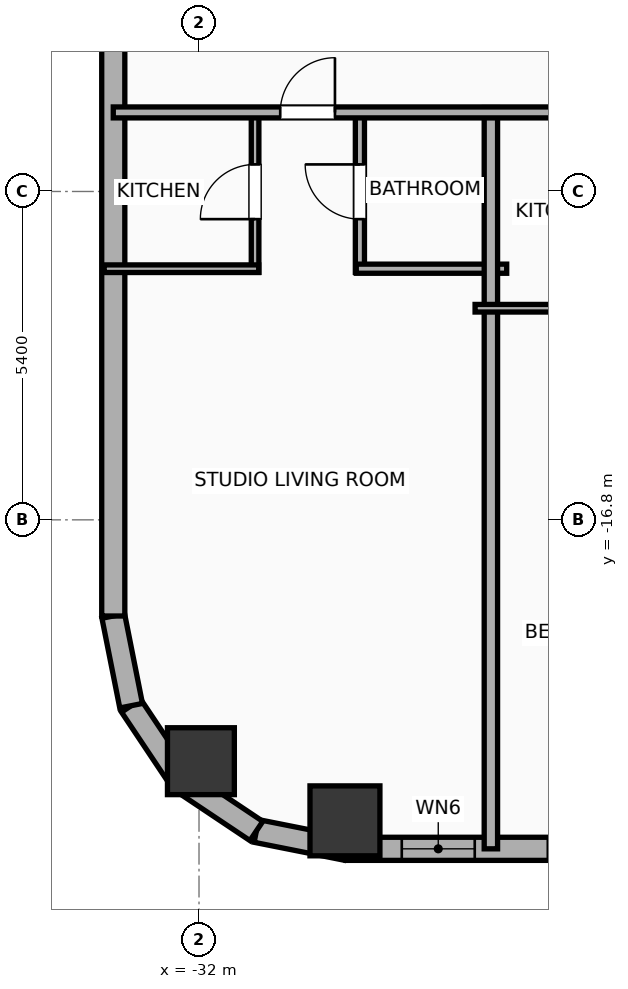
"""IFC4 building model, lengths in metres.
Left out: names, types, materials, properties, quantities, classifications, styles, units other than length and angle.
Written with IfcOpenShell. Run it as: python <this file> out.ifc"""

import sys

from ifc_helpers import new_model, si_unit, direction, frame, frame_2d, origin, origin_2d, place, context, subcontext, project, spatial, rectangle, hollow_rectangle, hollow_circle, extrude, element, fill, save


model = new_model("IFC4")
c1 = context("Model", 3, precision=1e-05, world=origin(), true_north=direction((0.0, 1.0)))
c2 = subcontext(c1, "Body", "Model", "MODEL_VIEW")
j1 = project(units=[si_unit("LENGTHUNIT", "METRE"), si_unit("PLANEANGLEUNIT", "RADIAN")], contexts=[c1])
p1 = place(None, origin())
s1 = spatial("IfcSite", under=j1, at=p1, CompositionType="ELEMENT")
p2 = place(p1, origin())
s2 = spatial("IfcBuilding", under=s1, at=p2, CompositionType="ELEMENT")
p3 = place(p2, frame((0.0, 0.0, 37.7)))
s3 = spatial("IfcBuildingStorey", under=s2, at=p3, CompositionType="ELEMENT", Elevation=37.7)
p4 = place(p3, frame((-29.6, -21.75, 0.0), z_axis=(0.0, 0.0, 1.0), x_axis=(1.0, 0.0, 0.0)))
e1 = element("IfcColumn", 1, at=p4, inside=s3, PredefinedType="COLUMN", context=c2, shape_type="SweptSolid", body=[
    extrude(hollow_rectangle(XDim=1.15, YDim=1.15, WallThickness=0.04, at=origin_2d()), origin(), (0.0, 0.0, 1.0), 3.9),
])
p5 = place(p3, frame((-31.969, -20.769, 0.0), z_axis=(0.0, 0.0, 1.0), x_axis=(1.0, 0.0, 0.0)))
e2 = element("IfcColumn", 2, at=p5, inside=s3, PredefinedType="COLUMN", context=c2, shape_type="SweptSolid", body=[
    extrude(hollow_circle(Radius=0.55, WallThickness=0.036, at=origin_2d()), origin(), (0.0, 0.0, 1.0), 3.9),
])
p6 = place(p3, frame((22.381, -22.21, 0.0), z_axis=(0.0, 0.0, 1.0), x_axis=(-1.0, 0.0, 0.0)))
e3 = element("IfcWall", 3, at=p6, inside=s3, PredefinedType="ELEMENTEDWALL", context=c2, shape_type="SweptSolid", body=[
    extrude(rectangle(XDim=51.963, YDim=0.38, at=frame_2d((25.981, 0.0))), origin(), (0.0, 0.0, 1.0), 3.65),
])
p7 = place(p6, frame((42.952, 0.0, 0.75)))
e4 = element("IfcOpeningElement", 4, at=p7, cuts=e3, PredefinedType="OPENING", context=c2, shape_type="SweptSolid", body=[
    extrude(rectangle(XDim=2.4, YDim=2.1, at=frame_2d((1.2, 1.05))), frame((0.0, 0.2, 0.0), z_axis=(0.0, -1.0, 0.0), x_axis=(1.0, 0.0, 0.0)), (0.0, 0.0, 1.0), 0.4),
])
p8 = place(p6, frame((49.847, 0.0, 0.75)))
e5 = element("IfcOpeningElement", 5, at=p8, cuts=e3, PredefinedType="OPENING", context=c2, shape_type="SweptSolid", body=[
    extrude(rectangle(XDim=1.2, YDim=2.05, at=frame_2d((0.6, 1.025))), frame((0.0, 0.2, 0.0), z_axis=(0.0, -1.0, 0.0), x_axis=(1.0, 0.0, 0.0)), (0.0, 0.0, 1.0), 0.4),
])
p9 = place(p6, frame((47.445, 0.0, 0.75)))
e6 = element("IfcOpeningElement", 6, at=p9, cuts=e3, PredefinedType="OPENING", context=c2, shape_type="SweptSolid", body=[
    extrude(rectangle(XDim=1.2, YDim=2.05, at=frame_2d((0.6, 1.025))), frame((0.0, 0.2, 0.0), z_axis=(0.0, -1.0, 0.0), x_axis=(1.0, 0.0, 0.0)), (0.0, 0.0, 1.0), 0.4),
])
p10 = place(p6, frame((39.526, 0.0, 0.75)))
e7 = element("IfcOpeningElement", 7, at=p10, cuts=e3, PredefinedType="OPENING", context=c2, shape_type="SweptSolid", body=[
    extrude(rectangle(XDim=1.2, YDim=2.05, at=frame_2d((0.6, 1.025))), frame((0.0, 0.2, 0.0), z_axis=(0.0, -1.0, 0.0), x_axis=(1.0, 0.0, 0.0)), (0.0, 0.0, 1.0), 0.4),
])
p11 = place(p6, frame((33.018, 0.0, 0.75)))
e8 = element("IfcOpeningElement", 8, at=p11, cuts=e3, PredefinedType="OPENING", context=c2, shape_type="SweptSolid", body=[
    extrude(rectangle(XDim=1.2, YDim=2.05, at=frame_2d((0.6, 1.025))), frame((0.0, 0.2, 0.0), z_axis=(0.0, -1.0, 0.0), x_axis=(1.0, 0.0, 0.0)), (0.0, 0.0, 1.0), 0.4),
])
p12 = place(p6, frame((36.813, 0.0, 0.75)))
e9 = element("IfcOpeningElement", 9, at=p12, cuts=e3, PredefinedType="OPENING", context=c2, shape_type="SweptSolid", body=[
    extrude(rectangle(XDim=1.2, YDim=2.05, at=frame_2d((0.6, 1.025))), frame((0.0, 0.2, 0.0), z_axis=(0.0, -1.0, 0.0), x_axis=(1.0, 0.0, 0.0)), (0.0, 0.0, 1.0), 0.4),
])
p13 = place(p6, frame((28.886, 0.0, 0.75)))
e10 = element("IfcOpeningElement", 10, at=p13, cuts=e3, PredefinedType="OPENING", context=c2, shape_type="SweptSolid", body=[
    extrude(rectangle(XDim=1.2, YDim=2.05, at=frame_2d((0.6, 1.025))), frame((0.0, 0.2, 0.0), z_axis=(0.0, -1.0, 0.0), x_axis=(1.0, 0.0, 0.0)), (0.0, 0.0, 1.0), 0.4),
])
p14 = place(p6, frame((23.306, 0.0, 0.75)))
e11 = element("IfcOpeningElement", 11, at=p14, cuts=e3, PredefinedType="OPENING", context=c2, shape_type="SweptSolid", body=[
    extrude(rectangle(XDim=1.2, YDim=2.05, at=frame_2d((0.6, 1.025))), frame((0.0, 0.2, 0.0), z_axis=(0.0, -1.0, 0.0), x_axis=(1.0, 0.0, 0.0)), (0.0, 0.0, 1.0), 0.4),
])
p15 = place(p6, frame((26.056, 0.0, 0.75)))
e12 = element("IfcOpeningElement", 12, at=p15, cuts=e3, PredefinedType="OPENING", context=c2, shape_type="SweptSolid", body=[
    extrude(rectangle(XDim=1.2, YDim=2.05, at=frame_2d((0.6, 1.025))), frame((0.0, 0.2, 0.0), z_axis=(0.0, -1.0, 0.0), x_axis=(1.0, 0.0, 0.0)), (0.0, 0.0, 1.0), 0.4),
])
p16 = place(p6, frame((18.811, 0.0, 0.75)))
e13 = element("IfcOpeningElement", 13, at=p16, cuts=e3, PredefinedType="OPENING", context=c2, shape_type="SweptSolid", body=[
    extrude(rectangle(XDim=1.2, YDim=2.05, at=frame_2d((0.6, 1.025))), frame((0.0, 0.2, 0.0), z_axis=(0.0, -1.0, 0.0), x_axis=(1.0, 0.0, 0.0)), (0.0, 0.0, 1.0), 0.4),
])
p17 = place(p6, frame((14.602, 0.0, 0.75)))
e14 = element("IfcOpeningElement", 14, at=p17, cuts=e3, PredefinedType="OPENING", context=c2, shape_type="SweptSolid", body=[
    extrude(rectangle(XDim=1.2, YDim=2.05, at=frame_2d((0.6, 1.025))), frame((0.0, 0.2, 0.0), z_axis=(0.0, -1.0, 0.0), x_axis=(1.0, 0.0, 0.0)), (0.0, 0.0, 1.0), 0.4),
])
p18 = place(p6, frame((11.852, 0.0, 0.75)))
e15 = element("IfcOpeningElement", 15, at=p18, cuts=e3, PredefinedType="OPENING", context=c2, shape_type="SweptSolid", body=[
    extrude(rectangle(XDim=1.2, YDim=2.05, at=frame_2d((0.6, 1.025))), frame((0.0, 0.2, 0.0), z_axis=(0.0, -1.0, 0.0), x_axis=(1.0, 0.0, 0.0)), (0.0, 0.0, 1.0), 0.4),
])
p19 = place(p6, frame((8.316, 0.0, 0.75)))
e16 = element("IfcOpeningElement", 16, at=p19, cuts=e3, PredefinedType="OPENING", context=c2, shape_type="SweptSolid", body=[
    extrude(rectangle(XDim=1.2, YDim=2.05, at=frame_2d((0.6, 1.025))), frame((0.0, 0.2, 0.0), z_axis=(0.0, -1.0, 0.0), x_axis=(1.0, 0.0, 0.0)), (0.0, 0.0, 1.0), 0.4),
])
p20 = place(p6, frame((6.286, 0.0, 0.75)))
e17 = element("IfcOpeningElement", 17, at=p20, cuts=e3, PredefinedType="OPENING", context=c2, shape_type="SweptSolid", body=[
    extrude(rectangle(XDim=1.2, YDim=2.05, at=frame_2d((0.6, 1.025))), frame((0.0, 0.2, 0.0), z_axis=(0.0, -1.0, 0.0), x_axis=(1.0, 0.0, 0.0)), (0.0, 0.0, 1.0), 0.4),
])
p21 = place(p6, frame((3.737, 0.0, 0.75)))
e18 = element("IfcOpeningElement", 18, at=p21, cuts=e3, PredefinedType="OPENING", context=c2, shape_type="SweptSolid", body=[
    extrude(rectangle(XDim=1.2, YDim=2.05, at=frame_2d((0.6, 1.025))), frame((0.0, 0.2, 0.0), z_axis=(0.0, -1.0, 0.0), x_axis=(1.0, 0.0, 0.0)), (0.0, 0.0, 1.0), 0.4),
])
p22 = place(p6, frame((1.291, 0.0, 0.75)))
e19 = element("IfcOpeningElement", 19, at=p22, cuts=e3, PredefinedType="OPENING", context=c2, shape_type="SweptSolid", body=[
    extrude(rectangle(XDim=1.2, YDim=2.05, at=frame_2d((0.6, 1.025))), frame((0.0, 0.2, 0.0), z_axis=(0.0, -1.0, 0.0), x_axis=(1.0, 0.0, 0.0)), (0.0, 0.0, 1.0), 0.4),
])
p23 = place(p3, frame((-29.581, -22.21, 0.0), z_axis=(0.0, 0.0, 1.0), x_axis=(-0.980786132421, 0.195086038585, 0.0)))
e20 = element("IfcWall", 20, at=p23, inside=s3, PredefinedType="ELEMENTEDWALL", context=c2, shape_type="SweptSolid", body=[
    extrude(rectangle(XDim=1.504, YDim=0.38, at=frame_2d((0.752, 0.0))), origin(), (0.0, 0.0, 1.0), 3.65),
])
p24 = place(p3, frame((-31.057, -21.917, 0.0), z_axis=(0.0, 0.0, 1.0), x_axis=(-0.831442848281, 0.555610286119, 0.0)))
e21 = element("IfcWall", 21, at=p24, inside=s3, PredefinedType="ELEMENTEDWALL", context=c2, shape_type="SweptSolid", body=[
    extrude(rectangle(XDim=1.485, YDim=0.38, at=frame_2d((0.743, 0.0))), origin(), (0.0, 0.0, 1.0), 3.65),
])
p25 = place(p3, frame((-32.292, -21.091, 0.0), z_axis=(0.0, 0.0, 1.0), x_axis=(-0.555572577804, 0.831468045563, 0.0)))
e22 = element("IfcWall", 22, at=p25, inside=s3, PredefinedType="ELEMENTEDWALL", context=c2, shape_type="SweptSolid", body=[
    extrude(rectangle(XDim=1.485, YDim=0.38, at=frame_2d((0.742, 0.0))), origin(), (0.0, 0.0, 1.0), 3.65),
])
p26 = place(p3, frame((-33.116, -19.857, 0.0), z_axis=(0.0, 0.0, 1.0), x_axis=(-0.195086038585, 0.980786132421, 0.0)))
e23 = element("IfcWall", 23, at=p26, inside=s3, PredefinedType="ELEMENTEDWALL", context=c2, shape_type="SweptSolid", body=[
    extrude(rectangle(XDim=1.504, YDim=0.38, at=frame_2d((0.752, 0.0))), origin(), (0.0, 0.0, 1.0), 3.65),
])
p27 = place(p3, frame((-33.41, -18.381, 0.0), z_axis=(0.0, 0.0, 1.0), x_axis=(0.0, 1.0, 0.0)))
e24 = element("IfcWall", 24, at=p27, inside=s3, PredefinedType="ELEMENTEDWALL", context=c2, shape_type="SweptSolid", body=[
    extrude(rectangle(XDim=36.763, YDim=0.38, at=frame_2d((18.381, 0.0))), origin(), (0.0, 0.0, 1.0), 3.65),
])
p28 = place(p27, frame((33.187, 0.0, 0.75)))
e25 = element("IfcOpeningElement", 25, at=p28, cuts=e24, PredefinedType="OPENING", context=c2, shape_type="SweptSolid", body=[
    extrude(rectangle(XDim=1.2, YDim=2.05, at=frame_2d((0.6, 1.025))), frame((0.0, 0.2, 0.0), z_axis=(0.0, -1.0, 0.0), x_axis=(1.0, 0.0, 0.0)), (0.0, 0.0, 1.0), 0.4),
])
p29 = place(p27, frame((22.126, 0.0, 0.75)))
e26 = element("IfcOpeningElement", 26, at=p29, cuts=e24, PredefinedType="OPENING", context=c2, shape_type="SweptSolid", body=[
    extrude(rectangle(XDim=1.2, YDim=2.05, at=frame_2d((0.6, 1.025))), frame((0.0, 0.2, 0.0), z_axis=(0.0, -1.0, 0.0), x_axis=(1.0, 0.0, 0.0)), (0.0, 0.0, 1.0), 0.4),
])
p30 = place(p27, frame((13.576, 0.0, 0.75)))
e27 = element("IfcOpeningElement", 27, at=p30, cuts=e24, PredefinedType="OPENING", context=c2, shape_type="SweptSolid", body=[
    extrude(rectangle(XDim=1.2, YDim=2.05, at=frame_2d((0.6, 1.025))), frame((0.0, 0.2, 0.0), z_axis=(0.0, -1.0, 0.0), x_axis=(1.0, 0.0, 0.0)), (0.0, 0.0, 1.0), 0.4),
])
p31 = place(p3, frame((-31.078, -12.73, 0.0), z_axis=(0.0, 0.0, 1.0), x_axis=(0.0, 1.0, 0.0)))
e28 = element("IfcWall", 28, at=p31, inside=s3, PredefinedType="PARTITIONING", context=c2, shape_type="SweptSolid", body=[
    extrude(rectangle(XDim=2.65, YDim=0.125, at=frame_2d((1.325, 0.0))), origin(), (0.0, 0.0, 1.0), 3.65),
])
p32 = place(p31, frame((0.875, 0.0, 0.0)))
e29 = element("IfcOpeningElement", 29, at=p32, cuts=e28, PredefinedType="OPENING", context=c2, shape_type="SweptSolid", body=[
    extrude(rectangle(XDim=0.9, YDim=2.05, at=frame_2d((0.45, 1.025))), frame((0.0, 0.073, 0.0), z_axis=(0.0, -1.0, 0.0), x_axis=(1.0, 0.0, 0.0)), (0.0, 0.0, 1.0), 0.145),
])
p33 = place(p3, frame((-29.354, -12.73, 0.0), z_axis=(0.0, 0.0, 1.0), x_axis=(0.0, 1.0, 0.0)))
e30 = element("IfcWall", 30, at=p33, inside=s3, PredefinedType="PLUMBINGWALL", context=c2, shape_type="SweptSolid", body=[
    extrude(rectangle(XDim=2.65, YDim=0.15, at=frame_2d((1.325, 0.0))), origin(), (0.0, 0.0, 1.0), 3.65),
])
p34 = place(p33, frame((0.875, 0.0, 0.0)))
e31 = element("IfcOpeningElement", 31, at=p34, cuts=e30, PredefinedType="OPENING", context=c2, shape_type="SweptSolid", body=[
    extrude(rectangle(XDim=0.9, YDim=2.05, at=frame_2d((0.45, 1.025))), frame((0.0, 0.085, 0.0), z_axis=(0.0, -1.0, 0.0), x_axis=(1.0, 0.0, 0.0)), (0.0, 0.0, 1.0), 0.17),
])
p35 = place(p3, frame((-33.56, -12.67, 0.0), z_axis=(0.0, 0.0, 1.0), x_axis=(1.0, 0.0, 0.0)))
e32 = element("IfcWall", 32, at=p35, inside=s3, PredefinedType="PARTITIONING", context=c2, shape_type="SweptSolid", body=[
    extrude(rectangle(XDim=2.542, YDim=0.125, at=frame_2d((1.271, 0.0))), origin(), (0.0, 0.0, 1.0), 3.65),
])
p36 = place(p3, frame((-29.414, -12.67, 0.0), z_axis=(0.0, 0.0, 1.0), x_axis=(1.0, 0.0, 0.0)))
e33 = element("IfcWall", 33, at=p36, inside=s3, PredefinedType="PLUMBINGWALL", context=c2, shape_type="SweptSolid", body=[
    extrude(rectangle(XDim=2.474, YDim=0.15, at=frame_2d((1.237, 0.0))), origin(), (0.0, 0.0, 1.0), 3.65),
])
p37 = place(p3, frame((-27.2, -22.21, 0.0), z_axis=(0.0, 0.0, 1.0), x_axis=(0.0, 1.0, 0.0)))
e34 = element("IfcWall", 34, at=p37, inside=s3, PredefinedType="PARTITIONING", context=c2, shape_type="SweptSolid", body=[
    extrude(rectangle(XDim=12.19, YDim=0.22, at=frame_2d((6.095, 0.0))), origin(), (0.0, 0.0, 1.0), 3.65),
])
p38 = place(p3, frame((-27.46, -13.32, 0.0), z_axis=(0.0, 0.0, 1.0), x_axis=(1.0, 0.0, 0.0)))
e35 = element("IfcWall", 35, at=p38, inside=s3, PredefinedType="PARTITIONING", context=c2, shape_type="SweptSolid", body=[
    extrude(rectangle(XDim=3.452, YDim=0.125, at=frame_2d((1.726, 0.0))), origin(), (0.0, 0.0, 1.0), 3.65),
])
p39 = place(p3, frame((-33.41, -10.1, 0.0), z_axis=(0.0, 0.0, 1.0), x_axis=(1.0, 0.0, 0.0)))
e36 = element("IfcWall", 36, at=p39, inside=s3, PredefinedType="PARTITIONING", context=c2, shape_type="SweptSolid", body=[
    extrude(rectangle(XDim=59.62, YDim=0.18, at=frame_2d((29.81, 0.0))), origin(), (0.0, 0.0, 1.0), 3.65),
])
p40 = place(p39, frame((2.746, 0.0, 0.0)))
e37 = element("IfcOpeningElement", 37, at=p40, cuts=e36, PredefinedType="OPENING", context=c2, shape_type="SweptSolid", body=[
    extrude(rectangle(XDim=0.9, YDim=2.05, at=frame_2d((0.45, 1.025))), frame((0.0, 0.1, 0.0), z_axis=(0.0, -1.0, 0.0), x_axis=(1.0, 0.0, 0.0)), (0.0, 0.0, 1.0), 0.2),
])
p41 = place(p39, frame((11.552, 0.0, 0.0)))
e38 = element("IfcOpeningElement", 38, at=p41, cuts=e36, PredefinedType="OPENING", context=c2, shape_type="SweptSolid", body=[
    extrude(rectangle(XDim=1.15, YDim=2.05, at=frame_2d((0.575, 1.025))), frame((0.0, 0.1, 0.0), z_axis=(0.0, -1.0, 0.0), x_axis=(1.0, 0.0, 0.0)), (0.0, 0.0, 1.0), 0.2),
])
p42 = place(p39, frame((22.379, 0.0, 0.0)))
e39 = element("IfcOpeningElement", 39, at=p42, cuts=e36, PredefinedType="OPENING", context=c2, shape_type="SweptSolid", body=[
    extrude(rectangle(XDim=1.15, YDim=2.05, at=frame_2d((0.575, 1.025))), frame((0.0, 0.1, 0.0), z_axis=(0.0, -1.0, 0.0), x_axis=(1.0, 0.0, 0.0)), (0.0, 0.0, 1.0), 0.2),
])
p43 = place(p39, frame((31.28, 0.0, 0.0)))
e40 = element("IfcOpeningElement", 40, at=p43, cuts=e36, PredefinedType="OPENING", context=c2, shape_type="SweptSolid", body=[
    extrude(rectangle(XDim=1.15, YDim=2.05, at=frame_2d((0.575, 1.025))), frame((0.0, 0.1, 0.0), z_axis=(0.0, -1.0, 0.0), x_axis=(1.0, 0.0, 0.0)), (0.0, 0.0, 1.0), 0.2),
])
p44 = place(p39, frame((36.02, 0.0, 0.0)))
e41 = element("IfcOpeningElement", 41, at=p44, cuts=e36, PredefinedType="OPENING", context=c2, shape_type="SweptSolid", body=[
    extrude(rectangle(XDim=0.9, YDim=2.05, at=frame_2d((0.45, 1.025))), frame((0.0, 0.1, 0.0), z_axis=(0.0, -1.0, 0.0), x_axis=(1.0, 0.0, 0.0)), (0.0, 0.0, 1.0), 0.2),
])
p45 = place(p39, frame((40.044, 0.0, 0.0)))
e42 = element("IfcOpeningElement", 42, at=p45, cuts=e36, PredefinedType="OPENING", context=c2, shape_type="SweptSolid", body=[
    extrude(rectangle(XDim=1.15, YDim=2.05, at=frame_2d((0.575, 1.025))), frame((0.0, 0.1, 0.0), z_axis=(0.0, -1.0, 0.0), x_axis=(1.0, 0.0, 0.0)), (0.0, 0.0, 1.0), 0.2),
])
p46 = place(p39, frame((45.613, 0.0, 0.0)))
e43 = element("IfcOpeningElement", 43, at=p46, cuts=e36, PredefinedType="OPENING", context=c2, shape_type="SweptSolid", body=[
    extrude(rectangle(XDim=1.15, YDim=2.05, at=frame_2d((0.575, 1.025))), frame((0.0, 0.1, 0.0), z_axis=(0.0, -1.0, 0.0), x_axis=(1.0, 0.0, 0.0)), (0.0, 0.0, 1.0), 0.2),
])
p47 = place(p39, frame((54.174, 0.0, 0.0)))
e44 = element("IfcOpeningElement", 44, at=p47, cuts=e36, PredefinedType="OPENING", context=c2, shape_type="SweptSolid", body=[
    extrude(rectangle(XDim=1.15, YDim=2.05, at=frame_2d((0.575, 1.025))), frame((0.0, 0.1, 0.0), z_axis=(0.0, -1.0, 0.0), x_axis=(1.0, 0.0, 0.0)), (0.0, 0.0, 1.0), 0.2),
])
p48 = place(p8, origin())
e45 = element("IfcWindow", 45, at=p48, inside=s3, PartitioningType="SINGLE_PANEL", PredefinedType="WINDOW", context=c2, shape_type="SweptSolid", body=[
    extrude(rectangle(XDim=1.2, YDim=2.05, at=frame_2d((0.6, 1.025))), frame((0.0, 0.03, 0.0), z_axis=(0.0, -1.0, 0.0), x_axis=(1.0, 0.0, 0.0)), (0.0, 0.0, 1.0), 0.06),
])
fill(e5, e45)
p49 = place(p9, origin())
e46 = element("IfcWindow", 46, at=p49, inside=s3, PartitioningType="SINGLE_PANEL", PredefinedType="WINDOW", context=c2, shape_type="SweptSolid", body=[
    extrude(rectangle(XDim=1.2, YDim=2.05, at=frame_2d((0.6, 1.025))), frame((0.0, 0.03, 0.0), z_axis=(0.0, -1.0, 0.0), x_axis=(1.0, 0.0, 0.0)), (0.0, 0.0, 1.0), 0.06),
])
fill(e6, e46)
p50 = place(p32, origin())
e47 = element("IfcDoor", 47, at=p50, inside=s3, OperationType="SINGLE_SWING_LEFT", PredefinedType="DOOR", context=c2, shape_type="SweptSolid", body=[
    extrude(rectangle(XDim=0.9, YDim=2.05, at=frame_2d((0.45, 1.025))), frame((0.0, 0.025, 0.0), z_axis=(0.0, -1.0, 0.0), x_axis=(1.0, 0.0, 0.0)), (0.0, 0.0, 1.0), 0.05),
])
fill(e29, e47)
p51 = place(p34, origin())
e48 = element("IfcDoor", 48, at=p51, inside=s3, OperationType="SINGLE_SWING_RIGHT", PredefinedType="DOOR", context=c2, shape_type="SweptSolid", body=[
    extrude(rectangle(XDim=0.9, YDim=2.05, at=frame_2d((0.45, 1.025))), frame((0.0, 0.025, 0.0), z_axis=(0.0, -1.0, 0.0), x_axis=(1.0, 0.0, 0.0)), (0.0, 0.0, 1.0), 0.05),
])
fill(e31, e48)
p52 = place(p40, origin())
e49 = element("IfcDoor", 49, at=p52, inside=s3, OperationType="SINGLE_SWING_RIGHT", PredefinedType="DOOR", context=c2, shape_type="SweptSolid", body=[
    extrude(rectangle(XDim=0.9, YDim=2.05, at=frame_2d((0.45, 1.025))), frame((0.0, 0.025, 0.0), z_axis=(0.0, -1.0, 0.0), x_axis=(1.0, 0.0, 0.0)), (0.0, 0.0, 1.0), 0.05),
])
fill(e37, e49)
save(model, sys.argv[1])
